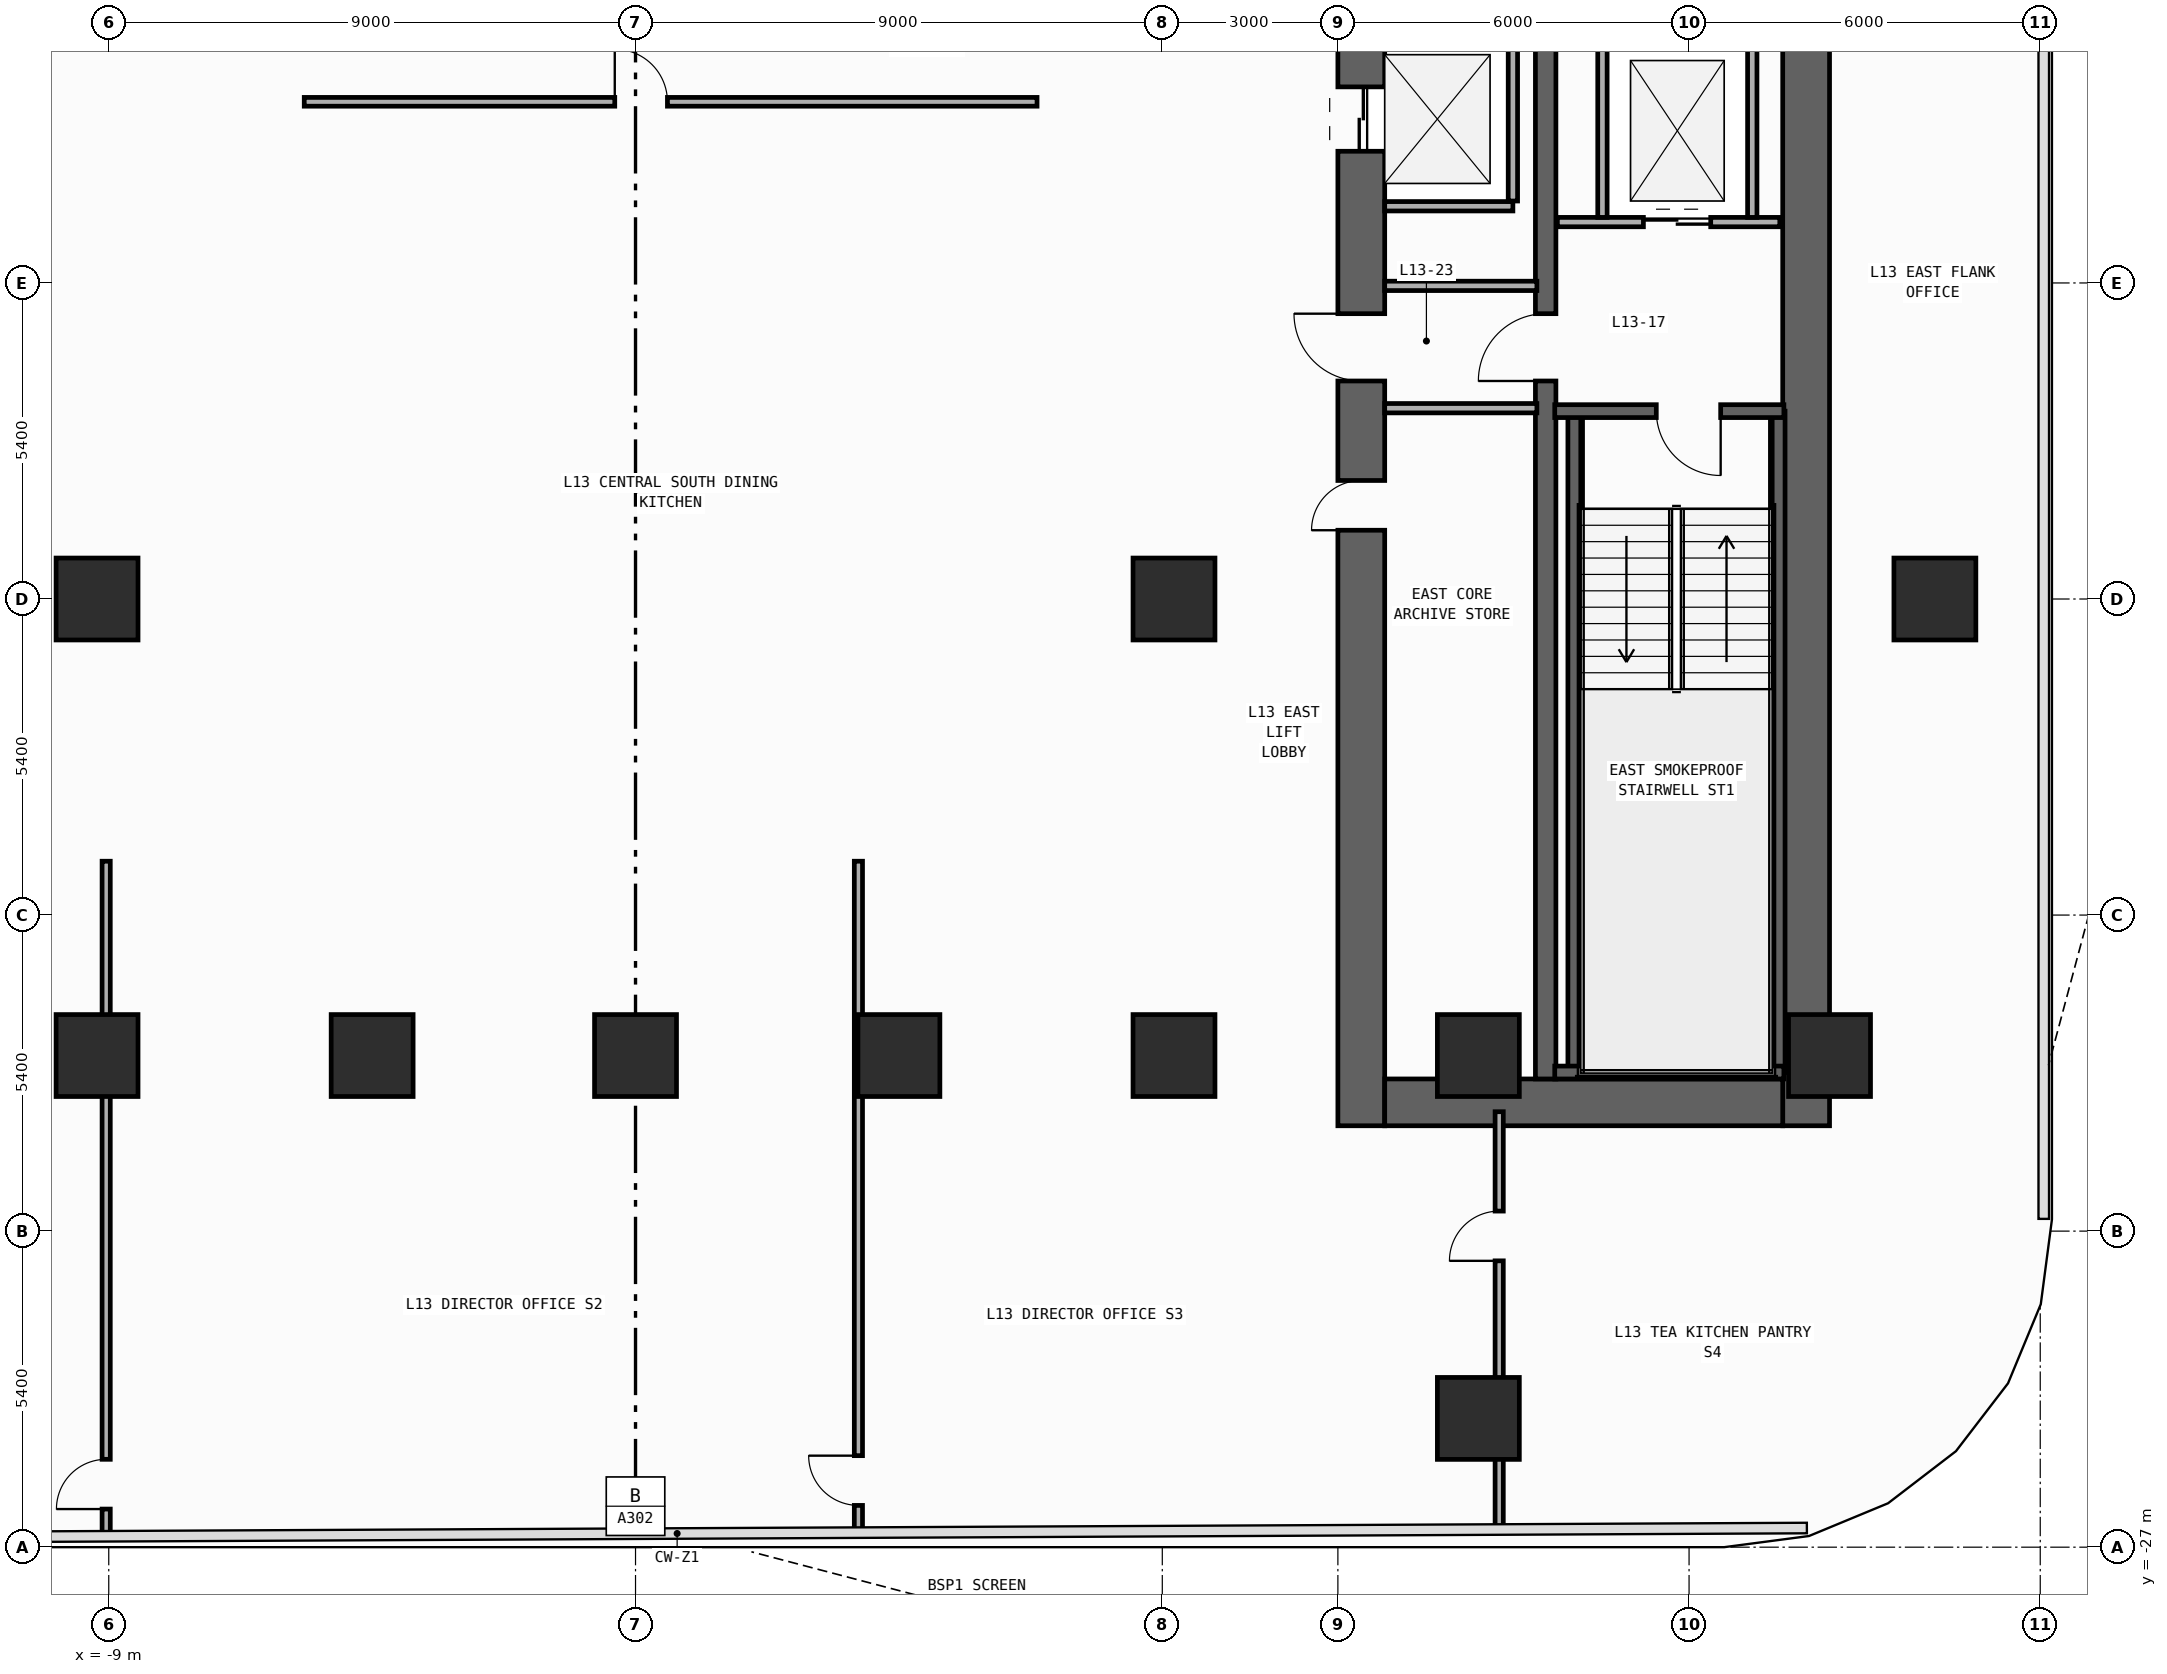
"""IFC4 building model, lengths in metres.
Left out: names, types, materials, properties, quantities, classifications, styles, units other than length and angle.
Written with IfcOpenShell. Run it as: python <this file> out.ifc"""

import sys

from ifc_helpers import new_model, si_unit, direction, frame, frame_2d, origin, origin_2d, place, context, subcontext, project, spatial, rectangle, extrude, element, fill, save


model = new_model("IFC4")
c1 = context("Model", 3, precision=1e-05, world=origin(), true_north=direction((0.0, 1.0)))
c2 = subcontext(c1, "Body", "Model", "MODEL_VIEW")
j1 = project(units=[si_unit("LENGTHUNIT", "METRE"), si_unit("PLANEANGLEUNIT", "RADIAN")], contexts=[c1])
p1 = place(None, origin())
s1 = spatial("IfcSite", under=j1, at=p1, CompositionType="ELEMENT")
p2 = place(p1, origin())
s2 = spatial("IfcBuilding", under=s1, at=p2, CompositionType="ELEMENT")
p3 = place(p2, frame((0.0, 0.0, 55.4)))
s3 = spatial("IfcBuildingStorey", under=s2, at=p3, CompositionType="ELEMENT", Elevation=55.4)
p4 = place(p3, frame((12.4, -19.8, 0.0), z_axis=(0.0, 0.0, 1.0), x_axis=(0.0, 1.0, 0.0)))
e1 = element("IfcWall", 1, at=p4, inside=s3, PredefinedType="SHEAR", context=c2, shape_type="SweptSolid", body=[
    extrude(rectangle(XDim=27.0, YDim=0.8, at=frame_2d((13.5, 0.0))), origin(), (0.0, 0.0, 1.0), 3.94),
])
p5 = place(p4, frame((23.05, 0.0, 0.0)))
e2 = element("IfcOpeningElement", 2, at=p5, cuts=e1, PredefinedType="OPENING", context=c2, shape_type="SweptSolid", body=[
    extrude(rectangle(XDim=1.1, YDim=2.2, at=frame_2d((0.55, 1.1))), frame((0.0, 0.41, 0.0), z_axis=(0.0, -1.0, 0.0), x_axis=(1.0, 0.0, 0.0)), (0.0, 0.0, 1.0), 0.82),
])
p6 = place(p4, frame((19.85, 0.0, 0.0)))
e3 = element("IfcOpeningElement", 3, at=p6, cuts=e1, PredefinedType="OPENING", context=c2, shape_type="SweptSolid", body=[
    extrude(rectangle(XDim=1.1, YDim=2.2, at=frame_2d((0.55, 1.1))), frame((0.0, 0.41, 0.0), z_axis=(0.0, -1.0, 0.0), x_axis=(1.0, 0.0, 0.0)), (0.0, 0.0, 1.0), 0.82),
])
p7 = place(p4, frame((16.65, 0.0, 0.0)))
e4 = element("IfcOpeningElement", 4, at=p7, cuts=e1, PredefinedType="OPENING", context=c2, shape_type="SweptSolid", body=[
    extrude(rectangle(XDim=1.1, YDim=2.2, at=frame_2d((0.55, 1.1))), frame((0.0, 0.41, 0.0), z_axis=(0.0, -1.0, 0.0), x_axis=(1.0, 0.0, 0.0)), (0.0, 0.0, 1.0), 0.82),
])
p8 = place(p4, frame((10.175, 0.0, 0.0)))
e5 = element("IfcOpeningElement", 5, at=p8, cuts=e1, PredefinedType="OPENING", context=c2, shape_type="SweptSolid", body=[
    extrude(rectangle(XDim=0.85, YDim=2.1, at=frame_2d((0.425, 1.05))), frame((0.0, 0.41, 0.0), z_axis=(0.0, -1.0, 0.0), x_axis=(1.0, 0.0, 0.0)), (0.0, 0.0, 1.0), 0.82),
])
p9 = place(p4, frame((12.725, 0.0, 0.0)))
e6 = element("IfcOpeningElement", 6, at=p9, cuts=e1, PredefinedType="OPENING", context=c2, shape_type="SweptSolid", body=[
    extrude(rectangle(XDim=1.15, YDim=2.2, at=frame_2d((0.575, 1.1))), frame((0.0, 0.41, 0.0), z_axis=(0.0, -1.0, 0.0), x_axis=(1.0, 0.0, 0.0)), (0.0, 0.0, 1.0), 0.82),
])
p10 = place(p4, frame((25.125, 0.0, 0.0)))
e7 = element("IfcOpeningElement", 7, at=p10, cuts=e1, PredefinedType="OPENING", context=c2, shape_type="SweptSolid", body=[
    extrude(rectangle(XDim=0.85, YDim=2.1, at=frame_2d((0.425, 1.05))), frame((0.0, 0.41, 0.0), z_axis=(0.0, -1.0, 0.0), x_axis=(1.0, 0.0, 0.0)), (0.0, 0.0, 1.0), 0.82),
])
p11 = place(p3, frame((20.0, -19.8, 0.0), z_axis=(0.0, 0.0, 1.0), x_axis=(0.0, 1.0, 0.0)))
e8 = element("IfcWall", 8, at=p11, inside=s3, PredefinedType="SHEAR", context=c2, shape_type="SweptSolid", body=[
    extrude(rectangle(XDim=27.0, YDim=0.8, at=frame_2d((13.5, 0.0))), origin(), (0.0, 0.0, 1.0), 3.94),
])
p12 = place(p3, frame((12.8, -19.4, 0.0), z_axis=(0.0, 0.0, 1.0), x_axis=(1.0, 0.0, 0.0)))
e9 = element("IfcWall", 9, at=p12, inside=s3, PredefinedType="SHEAR", context=c2, shape_type="SweptSolid", body=[
    extrude(rectangle(XDim=6.8, YDim=0.8, at=frame_2d((3.4, 0.0))), origin(), (0.0, 0.0, 1.0), 3.94),
])
p13 = place(p3, frame((15.55, -19.0, 0.0), z_axis=(0.0, 0.0, 1.0), x_axis=(0.0, 1.0, 0.0)))
e10 = element("IfcWall", 10, at=p13, inside=s3, PredefinedType="SHEAR", context=c2, shape_type="SweptSolid", body=[
    extrude(rectangle(XDim=25.4, YDim=0.35, at=frame_2d((12.7, 0.0))), origin(), (0.0, 0.0, 1.0), 3.94),
])
p14 = place(p13, frame((11.925, 0.0, 0.0)))
e11 = element("IfcOpeningElement", 11, at=p14, cuts=e10, PredefinedType="OPENING", context=c2, shape_type="SweptSolid", body=[
    extrude(rectangle(XDim=1.15, YDim=2.2, at=frame_2d((0.575, 1.1))), frame((0.0, 0.185, 0.0), z_axis=(0.0, -1.0, 0.0), x_axis=(1.0, 0.0, 0.0)), (0.0, 0.0, 1.0), 0.37),
])
p15 = place(p13, frame((24.325, 0.0, 0.0)))
e12 = element("IfcOpeningElement", 12, at=p15, cuts=e10, PredefinedType="OPENING", context=c2, shape_type="SweptSolid", body=[
    extrude(rectangle(XDim=0.85, YDim=2.1, at=frame_2d((0.425, 1.05))), frame((0.0, 0.185, 0.0), z_axis=(0.0, -1.0, 0.0), x_axis=(1.0, 0.0, 0.0)), (0.0, 0.0, 1.0), 0.37),
])
for number, where, z_axis, x_axis in (
    (13, (16.04, -18.89, 0.0), (0.0, 0.0, 1.0), (0.0, 1.0, 0.0)),
    (14, (19.53, -18.89, 0.0), (0.0, 0.0, 1.0), (0.0, 1.0, 0.0)),
):
    element("IfcWall", number, at=place(p3, frame(where, z_axis=z_axis, x_axis=x_axis)), inside=s3, PredefinedType="SHEAR", context=c2, shape_type="SweptSolid", body=[
        extrude(rectangle(XDim=11.3, YDim=0.22, at=frame_2d((5.65, 0.0))), origin(), (0.0, 0.0, 1.0), 3.94),
    ])
p16 = place(p3, frame((15.705, -18.89, 0.0), z_axis=(0.0, 0.0, 1.0), x_axis=(1.0, 0.0, 0.0)))
e15 = element("IfcWall", 15, at=p16, inside=s3, PredefinedType="SHEAR", context=c2, shape_type="SweptSolid", body=[
    extrude(rectangle(XDim=3.915, YDim=0.22, at=frame_2d((1.958, 0.0))), origin(), (0.0, 0.0, 1.0), 3.94),
])
p17 = place(p3, frame((19.62, -7.59, 0.0), z_axis=(0.0, 0.0, 1.0), x_axis=(-1.0, 0.0, 0.0)))
e16 = element("IfcWall", 16, at=p17, inside=s3, PredefinedType="SHEAR", context=c2, shape_type="SweptSolid", body=[
    extrude(rectangle(XDim=3.915, YDim=0.22, at=frame_2d((1.958, 0.0))), origin(), (0.0, 0.0, 1.0), 3.94),
])
p18 = place(p17, frame((1.08, 0.0, 0.0)))
e17 = element("IfcOpeningElement", 17, at=p18, cuts=e16, PredefinedType="OPENING", context=c2, shape_type="SweptSolid", body=[
    extrude(rectangle(XDim=1.1, YDim=2.2, at=frame_2d((0.55, 1.1))), frame((0.0, 0.12, 0.0), z_axis=(0.0, -1.0, 0.0), x_axis=(1.0, 0.0, 0.0)), (0.0, 0.0, 1.0), 0.24),
])
for number, where, z_axis, x_axis in (
    (18, (-9.2, -18.6, 0.0), (0.0, 0.0, 1.0), (1.0, 0.0, 0.0)),
    (19, (-9.2, -10.8, 0.0), (0.0, 0.0, 1.0), (1.0, 0.0, 0.0)),
    (20, (9.2, -18.6, 0.0), (0.0, 0.0, 1.0), (1.0, 0.0, 0.0)),
    (21, (9.2, -10.8, 0.0), (0.0, 0.0, 1.0), (1.0, 0.0, 0.0)),
    (22, (20.4, -18.6, 0.0), (0.0, 0.0, 1.0), (1.0, 0.0, 0.0)),
    (23, (14.4, -18.6, 0.0), (0.0, 0.0, 1.0), (1.0, 0.0, 0.0)),
    (24, (-4.5, -18.6, 0.0), (0.0, 0.0, 1.0), (1.0, 0.0, 0.0)),
    (25, (0.0, -18.6, 0.0), (0.0, 0.0, 1.0), (1.0, 0.0, 0.0)),
    (26, (4.5, -18.6, 0.0), (0.0, 0.0, 1.0), (1.0, 0.0, 0.0)),
    (27, (22.2, -10.8, 0.0), (0.0, 0.0, 1.0), (1.0, 0.0, 0.0)),
    (28, (14.4, -24.8, 0.0), (0.0, 0.0, 1.0), (1.0, 0.0, 0.0)),
):
    element("IfcColumn", number, at=place(p3, frame(where, z_axis=z_axis, x_axis=x_axis)), inside=s3, PredefinedType="COLUMN", context=c2, shape_type="SweptSolid", body=[
        extrude(rectangle(XDim=1.4, YDim=1.4, at=origin_2d()), origin(), (0.0, 0.0, 1.0), 4.2),
    ])
p19 = place(p3, frame((12.8, -4.09, 0.0), z_axis=(0.0, 0.0, 1.0), x_axis=(1.0, 0.0, 0.0)))
e29 = element("IfcWall", 29, at=p19, inside=s3, PredefinedType="STANDARD", context=c2, shape_type="SweptSolid", body=[
    extrude(rectangle(XDim=2.19, YDim=0.16, at=frame_2d((1.095, 0.0))), origin(), (0.0, 0.0, 1.0), 3.94),
])
p20 = place(p3, frame((14.99, -4.0, 0.0), z_axis=(0.0, 0.0, 1.0), x_axis=(0.0, 1.0, 0.0)))
e30 = element("IfcWall", 30, at=p20, inside=s3, PredefinedType="STANDARD", context=c2, shape_type="SweptSolid", body=[
    extrude(rectangle(XDim=2.8, YDim=0.16, at=frame_2d((1.4, 0.0))), origin(), (0.0, 0.0, 1.0), 3.94),
])
p21 = place(p3, frame((15.75, -4.36, 0.0), z_axis=(0.0, 0.0, 1.0), x_axis=(1.0, 0.0, 0.0)))
e31 = element("IfcWall", 31, at=p21, inside=s3, PredefinedType="STANDARD", context=c2, shape_type="SweptSolid", body=[
    extrude(rectangle(XDim=3.8, YDim=0.16, at=frame_2d((1.9, 0.0))), origin(), (0.0, 0.0, 1.0), 3.94),
])
p22 = place(p21, frame((1.47, 0.0, 0.0)))
e32 = element("IfcOpeningElement", 32, at=p22, cuts=e31, PredefinedType="OPENING", context=c2, shape_type="SweptSolid", body=[
    extrude(rectangle(XDim=1.15, YDim=2.2, at=frame_2d((0.575, 1.1))), frame((0.0, 0.09, 0.0), z_axis=(0.0, -1.0, 0.0), x_axis=(1.0, 0.0, 0.0)), (0.0, 0.0, 1.0), 0.18),
])
for number, where, z_axis, x_axis in (
    (33, (16.52, -4.28, 0.0), (0.0, 0.0, 1.0), (0.0, 1.0, 0.0)),
    (34, (19.08, -4.28, 0.0), (0.0, 0.0, 1.0), (0.0, 1.0, 0.0)),
):
    element("IfcWall", number, at=place(p3, frame(where, z_axis=z_axis, x_axis=x_axis)), inside=s3, PredefinedType="STANDARD", context=c2, shape_type="SweptSolid", body=[
        extrude(rectangle(XDim=2.98, YDim=0.16, at=frame_2d((1.49, 0.0))), origin(), (0.0, 0.0, 1.0), 3.94),
    ])
for number, where, z_axis, x_axis in (
    (35, (12.8, -5.45, 0.0), (0.0, 0.0, 1.0), (1.0, 0.0, 0.0)),
    (36, (12.8, -7.54, 0.0), (0.0, 0.0, 1.0), (1.0, 0.0, 0.0)),
):
    element("IfcWall", number, at=place(p3, frame(where, z_axis=z_axis, x_axis=x_axis)), inside=s3, PredefinedType="STANDARD", context=c2, shape_type="SweptSolid", body=[
        extrude(rectangle(XDim=2.6, YDim=0.16, at=frame_2d((1.3, 0.0))), origin(), (0.0, 0.0, 1.0), 3.94),
    ])
p23 = place(p3, frame((-5.66, -2.305, 0.0), z_axis=(0.0, 0.0, 1.0), x_axis=(1.0, 0.0, 0.0)))
e37 = element("IfcWall", 37, at=p23, inside=s3, PredefinedType="PARTITIONING", context=c2, shape_type="SweptSolid", body=[
    extrude(rectangle(XDim=12.52, YDim=0.15, at=frame_2d((6.26, 0.0))), origin(), (0.0, 0.0, 1.0), 3.94),
])
p24 = place(p23, frame((5.305, 0.0, 0.0)))
e38 = element("IfcOpeningElement", 38, at=p24, cuts=e37, PredefinedType="OPENING", context=c2, shape_type="SweptSolid", body=[
    extrude(rectangle(XDim=0.9, YDim=2.15, at=frame_2d((0.45, 1.075))), frame((0.0, 0.085, 0.0), z_axis=(0.0, -1.0, 0.0), x_axis=(1.0, 0.0, 0.0)), (0.0, 0.0, 1.0), 0.17),
])
p25 = place(p3, frame((-9.044, -26.809, 0.0), z_axis=(0.0, 0.0, 1.0), x_axis=(0.0, 1.0, 0.0)))
e39 = element("IfcWall", 39, at=p25, inside=s3, PredefinedType="PARTITIONING", context=c2, shape_type="SweptSolid", body=[
    extrude(rectangle(XDim=11.529, YDim=0.14, at=frame_2d((5.764, 0.0))), origin(), (0.0, 0.0, 1.0), 3.14),
])
p26 = place(p25, frame((0.46, 0.0, 0.0)))
e40 = element("IfcOpeningElement", 40, at=p26, cuts=e39, PredefinedType="OPENING", context=c2, shape_type="SweptSolid", body=[
    extrude(rectangle(XDim=0.85, YDim=2.1, at=frame_2d((0.425, 1.05))), frame((0.0, 0.08, 0.0), z_axis=(0.0, -1.0, 0.0), x_axis=(1.0, 0.0, 0.0)), (0.0, 0.0, 1.0), 0.16),
])
p27 = place(p3, frame((3.808, -26.746, 0.0), z_axis=(0.0, 0.0, 1.0), x_axis=(0.0, 1.0, 0.0)))
e41 = element("IfcWall", 41, at=p27, inside=s3, PredefinedType="PARTITIONING", context=c2, shape_type="SweptSolid", body=[
    extrude(rectangle(XDim=11.466, YDim=0.14, at=frame_2d((5.733, 0.0))), origin(), (0.0, 0.0, 1.0), 3.94),
])
p28 = place(p27, frame((0.46, 0.0, 0.0)))
e42 = element("IfcOpeningElement", 42, at=p28, cuts=e41, PredefinedType="OPENING", context=c2, shape_type="SweptSolid", body=[
    extrude(rectangle(XDim=0.85, YDim=2.1, at=frame_2d((0.425, 1.05))), frame((0.0, 0.08, 0.0), z_axis=(0.0, -1.0, 0.0), x_axis=(1.0, 0.0, 0.0)), (0.0, 0.0, 1.0), 0.16),
])
p29 = place(p3, frame((14.756, -26.693, 0.0), z_axis=(0.0, 0.0, 1.0), x_axis=(0.0, 1.0, 0.0)))
e43 = element("IfcWall", 43, at=p29, inside=s3, PredefinedType="PARTITIONING", context=c2, shape_type="SweptSolid", body=[
    extrude(rectangle(XDim=7.133, YDim=0.14, at=frame_2d((3.567, 0.0))), origin(), (0.0, 0.0, 1.0), 3.94),
])
p30 = place(p29, frame((4.586, 0.0, 0.0)))
e44 = element("IfcOpeningElement", 44, at=p30, cuts=e43, PredefinedType="OPENING", context=c2, shape_type="SweptSolid", body=[
    extrude(rectangle(XDim=0.85, YDim=2.1, at=frame_2d((0.425, 1.05))), frame((0.0, 0.08, 0.0), z_axis=(0.0, -1.0, 0.0), x_axis=(1.0, 0.0, 0.0)), (0.0, 0.0, 1.0), 0.16),
])
p31 = place(p18, origin())
e45 = element("IfcDoor", 45, at=p31, inside=s3, OperationType="SINGLE_SWING_LEFT", PredefinedType="DOOR", context=c2, shape_type="SweptSolid", body=[
    extrude(rectangle(XDim=1.1, YDim=2.2, at=frame_2d((0.55, 1.1))), frame((0.0, 0.025, 0.0), z_axis=(0.0, -1.0, 0.0), x_axis=(1.0, 0.0, 0.0)), (0.0, 0.0, 1.0), 0.05),
])
fill(e17, e45)
p32 = place(p7, origin())
e46 = element("IfcDoor", 46, at=p32, inside=s3, OperationType="DOUBLE_DOOR_SLIDING", PredefinedType="DOOR", context=c2, shape_type="SweptSolid", body=[
    extrude(rectangle(XDim=1.1, YDim=2.2, at=frame_2d((0.55, 1.1))), frame((0.0, 0.025, 0.0), z_axis=(0.0, -1.0, 0.0), x_axis=(1.0, 0.0, 0.0)), (0.0, 0.0, 1.0), 0.05),
])
fill(e4, e46)
p33 = place(p8, origin())
e47 = element("IfcDoor", 47, at=p33, inside=s3, OperationType="SINGLE_SWING_LEFT", PredefinedType="DOOR", context=c2, shape_type="SweptSolid", body=[
    extrude(rectangle(XDim=0.85, YDim=2.1, at=frame_2d((0.425, 1.05))), frame((0.0, 0.025, 0.0), z_axis=(0.0, -1.0, 0.0), x_axis=(1.0, 0.0, 0.0)), (0.0, 0.0, 1.0), 0.05),
])
fill(e5, e47)
p34 = place(p9, origin())
e48 = element("IfcDoor", 48, at=p34, inside=s3, OperationType="SINGLE_SWING_RIGHT", PredefinedType="DOOR", context=c2, shape_type="SweptSolid", body=[
    extrude(rectangle(XDim=1.15, YDim=2.2, at=frame_2d((0.575, 1.1))), frame((0.0, 0.025, 0.0), z_axis=(0.0, -1.0, 0.0), x_axis=(1.0, 0.0, 0.0)), (0.0, 0.0, 1.0), 0.05),
])
fill(e6, e48)
p35 = place(p14, origin())
e49 = element("IfcDoor", 49, at=p35, inside=s3, OperationType="SINGLE_SWING_LEFT", PredefinedType="DOOR", context=c2, shape_type="SweptSolid", body=[
    extrude(rectangle(XDim=1.15, YDim=2.2, at=frame_2d((0.575, 1.1))), frame((0.0, 0.025, 0.0), z_axis=(0.0, -1.0, 0.0), x_axis=(1.0, 0.0, 0.0)), (0.0, 0.0, 1.0), 0.05),
])
fill(e11, e49)
p36 = place(p22, origin())
e50 = element("IfcDoor", 50, at=p36, inside=s3, OperationType="DOUBLE_DOOR_SLIDING", PredefinedType="DOOR", context=c2, shape_type="SweptSolid", body=[
    extrude(rectangle(XDim=1.15, YDim=2.2, at=frame_2d((0.575, 1.1))), frame((0.0, 0.025, 0.0), z_axis=(0.0, -1.0, 0.0), x_axis=(1.0, 0.0, 0.0)), (0.0, 0.0, 1.0), 0.05),
])
fill(e32, e50)
p37 = place(p24, origin())
e51 = element("IfcDoor", 51, at=p37, inside=s3, OperationType="SINGLE_SWING_LEFT", PredefinedType="DOOR", context=c2, shape_type="SweptSolid", body=[
    extrude(rectangle(XDim=0.9, YDim=2.15, at=frame_2d((0.45, 1.075))), frame((0.0, 0.025, 0.0), z_axis=(0.0, -1.0, 0.0), x_axis=(1.0, 0.0, 0.0)), (0.0, 0.0, 1.0), 0.05),
])
fill(e38, e51)
p38 = place(p26, origin())
e52 = element("IfcDoor", 52, at=p38, inside=s3, OperationType="SINGLE_SWING_LEFT", PredefinedType="DOOR", context=c2, shape_type="SweptSolid", body=[
    extrude(rectangle(XDim=0.85, YDim=2.1, at=frame_2d((0.425, 1.05))), frame((0.0, 0.025, 0.0), z_axis=(0.0, -1.0, 0.0), x_axis=(1.0, 0.0, 0.0)), (0.0, 0.0, 1.0), 0.05),
])
fill(e40, e52)
p39 = place(p28, origin())
e53 = element("IfcDoor", 53, at=p39, inside=s3, OperationType="SINGLE_SWING_RIGHT", PredefinedType="DOOR", context=c2, shape_type="SweptSolid", body=[
    extrude(rectangle(XDim=0.85, YDim=2.1, at=frame_2d((0.425, 1.05))), frame((0.0, 0.025, 0.0), z_axis=(0.0, -1.0, 0.0), x_axis=(1.0, 0.0, 0.0)), (0.0, 0.0, 1.0), 0.05),
])
fill(e42, e53)
p40 = place(p30, origin())
e54 = element("IfcDoor", 54, at=p40, inside=s3, OperationType="SINGLE_SWING_LEFT", PredefinedType="DOOR", context=c2, shape_type="SweptSolid", body=[
    extrude(rectangle(XDim=0.85, YDim=2.1, at=frame_2d((0.425, 1.05))), frame((0.0, 0.025, 0.0), z_axis=(0.0, -1.0, 0.0), x_axis=(1.0, 0.0, 0.0)), (0.0, 0.0, 1.0), 0.05),
])
fill(e44, e54)
save(model, sys.argv[1])
